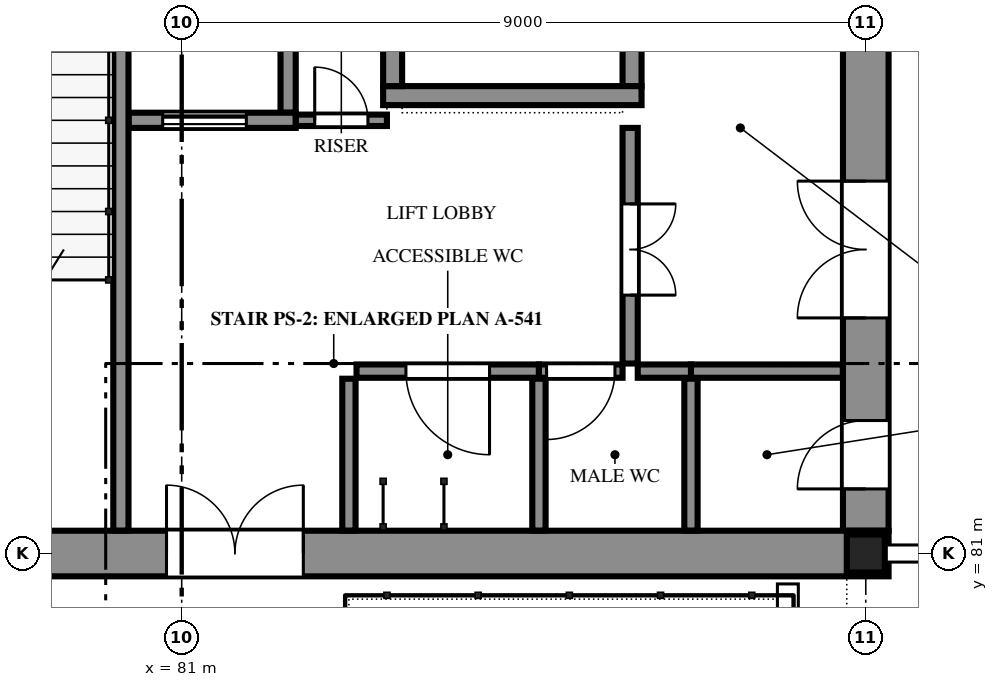
"""IFC4 building model, lengths in metres.
Left out: names, types, materials, properties, quantities, classifications, styles, units other than length and angle.
Written with IfcOpenShell. Run it as: python <this file> out.ifc"""

import sys

from ifc_helpers import new_model, si_unit, direction, frame, frame_2d, origin, origin_2d, place, context, subcontext, project, spatial, polyline, rectangle, hollow_rectangle, outline, extrude, element, fill, save


model = new_model("IFC4")
c1 = context("Model", 3, precision=1e-05, world=origin(), true_north=direction((0.0, 1.0)))
c2 = subcontext(c1, "Body", "Model", "MODEL_VIEW")
j1 = project(units=[si_unit("LENGTHUNIT", "METRE"), si_unit("PLANEANGLEUNIT", "RADIAN")], contexts=[c1])
p1 = place(None, origin())
s1 = spatial("IfcSite", under=j1, at=p1, CompositionType="ELEMENT")
p2 = place(p1, origin())
s2 = spatial("IfcBuilding", under=s1, at=p2, CompositionType="ELEMENT")
p3 = place(p2, frame((0.0, 0.0, 7.5)))
s3 = spatial("IfcBuildingStorey", under=s2, at=p3, CompositionType="ELEMENT", Elevation=7.5)
p4 = place(p3, frame((90.0, 81.0, 0.0), z_axis=(0.0, 0.0, 1.0), x_axis=(1.0, 0.0, 0.0)))
e1 = element("IfcColumn", 1, at=p4, inside=s3, PredefinedType="COLUMN", context=c2, shape_type="SweptSolid", body=[
    extrude(hollow_rectangle(XDim=0.5, YDim=0.5, WallThickness=0.032, at=origin_2d()), origin(), (0.0, 0.0, 1.0), 4.2),
])
p5 = place(p3, frame((71.7, 81.0, 0.0), z_axis=(0.0, 0.0, 1.0), x_axis=(1.0, 0.0, 0.0)))
e2 = element("IfcWall", 2, at=p5, inside=s3, PredefinedType="SOLIDWALL", context=c2, shape_type="SweptSolid", body=[
    extrude(rectangle(XDim=18.6, YDim=0.6, at=frame_2d((9.3, 0.0))), origin(), (0.0, 0.0, 1.0), 4.2),
])
p6 = place(p5, frame((1.6, 0.0, 0.0)))
e3 = element("IfcOpeningElement", 3, at=p6, cuts=e2, PredefinedType="OPENING", context=c2, shape_type="SweptSolid", body=[
    extrude(rectangle(XDim=1.8, YDim=2.1, at=frame_2d((0.9, 1.05))), frame((0.0, 0.31, 0.0), z_axis=(0.0, -1.0, 0.0), x_axis=(1.0, 0.0, 0.0)), (0.0, 0.0, 1.0), 0.62),
])
p7 = place(p5, frame((5.6, 0.0, 0.0)))
e4 = element("IfcOpeningElement", 4, at=p7, cuts=e2, PredefinedType="OPENING", context=c2, shape_type="SweptSolid", body=[
    extrude(rectangle(XDim=1.8, YDim=2.1, at=frame_2d((0.9, 1.05))), frame((0.0, 0.31, 0.0), z_axis=(0.0, -1.0, 0.0), x_axis=(1.0, 0.0, 0.0)), (0.0, 0.0, 1.0), 0.62),
])
p8 = place(p5, frame((9.1, 0.0, 0.0)))
e5 = element("IfcOpeningElement", 5, at=p8, cuts=e2, PredefinedType="OPENING", context=c2, shape_type="SweptSolid", body=[
    extrude(rectangle(XDim=1.8, YDim=2.1, at=frame_2d((0.9, 1.05))), frame((0.0, 0.31, 0.0), z_axis=(0.0, -1.0, 0.0), x_axis=(1.0, 0.0, 0.0)), (0.0, 0.0, 1.0), 0.62),
])
p9 = place(p3, frame((90.0, 81.3, 0.0), z_axis=(0.0, 0.0, 1.0), x_axis=(0.0, 1.0, 0.0)))
e6 = element("IfcWall", 6, at=p9, inside=s3, PredefinedType="SOLIDWALL", context=c2, shape_type="SweptSolid", body=[
    extrude(rectangle(XDim=8.4, YDim=0.6, at=frame_2d((4.2, 0.0))), origin(), (0.0, 0.0, 1.0), 4.2),
])
p10 = place(p9, frame((2.8, 0.0, 0.0)))
e7 = element("IfcOpeningElement", 7, at=p10, cuts=e6, PredefinedType="OPENING", context=c2, shape_type="SweptSolid", body=[
    extrude(rectangle(XDim=1.8, YDim=2.1, at=frame_2d((0.9, 1.05))), frame((0.0, 0.31, 0.0), z_axis=(0.0, -1.0, 0.0), x_axis=(1.0, 0.0, 0.0)), (0.0, 0.0, 1.0), 0.62),
])
p11 = place(p9, frame((0.55, 0.0, 0.0)))
e8 = element("IfcOpeningElement", 8, at=p11, cuts=e6, PredefinedType="OPENING", context=c2, shape_type="SweptSolid", body=[
    extrude(rectangle(XDim=0.9, YDim=2.1, at=frame_2d((0.45, 1.05))), frame((0.0, 0.31, 0.0), z_axis=(0.0, -1.0, 0.0), x_axis=(1.0, 0.0, 0.0)), (0.0, 0.0, 1.0), 0.62),
])
p12 = place(p3, frame((80.2, 81.302, -0.13), z_axis=(0.0, 0.0, 1.0), x_axis=(0.0, 1.0, 0.0)))
e9 = element("IfcWall", 9, at=p12, inside=s3, PredefinedType="SOLIDWALL", context=c2, shape_type="SweptSolid", body=[
    extrude(rectangle(XDim=8.396, YDim=0.2, at=frame_2d((4.198, 0.0))), origin(), (0.0, 0.0, 1.0), 3.646),
])
p13 = place(p3, frame((80.302, 86.7, 0.0), z_axis=(0.0, 0.0, 1.0), x_axis=(1.0, 0.0, 0.0)))
e10 = element("IfcWall", 10, at=p13, inside=s3, PredefinedType="SOLIDWALL", context=c2, shape_type="SweptSolid", body=[
    extrude(rectangle(XDim=2.198, YDim=0.2, at=frame_2d((1.099, 0.0))), origin(), (0.0, 0.0, 1.0), 3.516),
])
p14 = place(p13, frame((0.448, 0.0, 0.0)))
e11 = element("IfcOpeningElement", 11, at=p14, cuts=e10, PredefinedType="OPENING", context=c2, shape_type="SweptSolid", body=[
    extrude(rectangle(XDim=1.1, YDim=2.1, at=frame_2d((0.55, 1.05))), frame((0.0, 0.11, 0.0), z_axis=(0.0, -1.0, 0.0), x_axis=(1.0, 0.0, 0.0)), (0.0, 0.0, 1.0), 0.22),
])
p15 = place(p3, frame((82.4, 86.8, 0.0), z_axis=(0.0, 0.0, 1.0), x_axis=(0.0, 1.0, 0.0)))
e12 = element("IfcWall", 12, at=p15, inside=s3, PredefinedType="SOLIDWALL", context=c2, shape_type="SweptSolid", body=[
    extrude(rectangle(XDim=2.898, YDim=0.2, at=frame_2d((1.449, 0.0))), origin(), (0.0, 0.0, 1.0), 3.516),
])
p16 = place(p3, frame((83.65, 87.025, 0.0), z_axis=(0.0, 0.0, 1.0), x_axis=(1.0, 0.0, 0.0)))
e13 = element("IfcWall", 13, at=p16, inside=s3, PredefinedType="SOLIDWALL", context=c2, shape_type="SweptSolid", body=[
    extrude(rectangle(XDim=3.4, YDim=0.25, at=frame_2d((1.7, 0.0))), origin(), (0.0, 0.0, 1.0), 3.516),
])
p17 = place(p3, frame((83.775, 87.15, 0.0), z_axis=(0.0, 0.0, 1.0), x_axis=(0.0, 1.0, 0.0)))
e14 = element("IfcWall", 14, at=p17, inside=s3, PredefinedType="SOLIDWALL", context=c2, shape_type="SweptSolid", body=[
    extrude(rectangle(XDim=2.2, YDim=0.25, at=frame_2d((1.1, 0.0))), origin(), (0.0, 0.0, 1.0), 3.516),
])
p18 = place(p3, frame((86.925, 87.15, 0.0), z_axis=(0.0, 0.0, 1.0), x_axis=(0.0, 1.0, 0.0)))
e15 = element("IfcWall", 15, at=p18, inside=s3, PredefinedType="SOLIDWALL", context=c2, shape_type="SweptSolid", body=[
    extrude(rectangle(XDim=2.2, YDim=0.25, at=frame_2d((1.1, 0.0))), origin(), (0.0, 0.0, 1.0), 3.516),
])
p19 = place(p18, frame((0.5, 0.0, 0.0)))
e16 = element("IfcOpeningElement", 16, at=p19, cuts=e15, PredefinedType="OPENING", context=c2, shape_type="SweptSolid", body=[
    extrude(rectangle(XDim=1.2, YDim=2.1, at=frame_2d((0.6, 1.05))), frame((0.0, 0.135, 0.0), z_axis=(0.0, -1.0, 0.0), x_axis=(1.0, 0.0, 0.0)), (0.0, 0.0, 1.0), 0.27),
])
p20 = place(p3, frame((85.7, 83.4, 0.0), z_axis=(0.0, 0.0, 1.0), x_axis=(-1.0, 0.0, 0.0)))
e17 = element("IfcWall", 17, at=p20, inside=s3, PredefinedType="PARTITIONING", context=c2, shape_type="SweptSolid", body=[
    extrude(rectangle(XDim=2.4, YDim=0.175, at=frame_2d((1.2, 0.0))), origin(), (0.0, 0.0, 1.0), 3.307),
])
p21 = place(p20, frame((0.65, 0.0, 0.0)))
e18 = element("IfcOpeningElement", 18, at=p21, cuts=e17, PredefinedType="OPENING", context=c2, shape_type="SweptSolid", body=[
    extrude(rectangle(XDim=1.1, YDim=2.1, at=frame_2d((0.55, 1.05))), frame((0.0, 0.097, 0.0), z_axis=(0.0, -1.0, 0.0), x_axis=(1.0, 0.0, 0.0)), (0.0, 0.0, 1.0), 0.195),
])
p22 = place(p3, frame((83.2, 83.3, 0.0), z_axis=(0.0, 0.0, 1.0), x_axis=(0.0, -1.0, 0.0)))
e19 = element("IfcWall", 19, at=p22, inside=s3, PredefinedType="PARTITIONING", context=c2, shape_type="SweptSolid", body=[
    extrude(rectangle(XDim=1.998, YDim=0.175, at=frame_2d((0.999, 0.0))), origin(), (0.0, 0.0, 1.0), 3.307),
])
p23 = place(p3, frame((86.8, 83.4, 0.0), z_axis=(0.0, 0.0, 1.0), x_axis=(-1.0, 0.0, 0.0)))
e20 = element("IfcWall", 20, at=p23, inside=s3, PredefinedType="PARTITIONING", context=c2, shape_type="SweptSolid", body=[
    extrude(rectangle(XDim=1.1, YDim=0.175, at=frame_2d((0.55, 0.0))), origin(), (0.0, 0.0, 1.0), 3.307),
])
p24 = place(p23, frame((0.1, 0.0, 0.0)))
e21 = element("IfcOpeningElement", 21, at=p24, cuts=e20, PredefinedType="OPENING", context=c2, shape_type="SweptSolid", body=[
    extrude(rectangle(XDim=0.9, YDim=2.1, at=frame_2d((0.45, 1.05))), frame((0.0, 0.097, 0.0), z_axis=(0.0, -1.0, 0.0), x_axis=(1.0, 0.0, 0.0)), (0.0, 0.0, 1.0), 0.195),
])
p25 = place(p3, frame((86.9, 86.6, 0.0), z_axis=(0.0, 0.0, 1.0), x_axis=(0.0, -1.0, 0.0)))
e22 = element("IfcWall", 22, at=p25, inside=s3, PredefinedType="PARTITIONING", context=c2, shape_type="SweptSolid", body=[
    extrude(rectangle(XDim=3.1, YDim=0.2, at=frame_2d((1.55, 0.0))), origin(), (0.0, 0.0, 1.0), 3.382),
])
p26 = place(p25, frame((1.0, 0.0, 0.0)))
e23 = element("IfcOpeningElement", 23, at=p26, cuts=e22, PredefinedType="OPENING", context=c2, shape_type="SweptSolid", body=[
    extrude(rectangle(XDim=1.2, YDim=2.1, at=frame_2d((0.6, 1.05))), frame((0.0, 0.11, 0.0), z_axis=(0.0, -1.0, 0.0), x_axis=(1.0, 0.0, 0.0)), (0.0, 0.0, 1.0), 0.22),
])
p27 = place(p3, frame((82.502, 86.7, 0.0), z_axis=(0.0, 0.0, 1.0), x_axis=(1.0, 0.0, 0.0)))
e24 = element("IfcWall", 24, at=p27, inside=s3, PredefinedType="SOLIDWALL", context=c2, shape_type="SweptSolid", body=[
    extrude(rectangle(XDim=1.198, YDim=0.15, at=frame_2d((0.599, 0.0))), origin(), (0.0, 0.0, 1.0), 3.516),
])
p28 = place(p27, frame((0.248, 0.0, 0.0)))
e25 = element("IfcOpeningElement", 25, at=p28, cuts=e24, PredefinedType="OPENING", context=c2, shape_type="SweptSolid", body=[
    extrude(rectangle(XDim=0.7, YDim=2.0, at=frame_2d((0.35, 1.0))), frame((0.0, 0.085, 0.0), z_axis=(0.0, -1.0, 0.0), x_axis=(1.0, 0.0, 0.0)), (0.0, 0.0, 1.0), 0.17),
])
p29 = place(p3, frame((89.698, 83.4, 0.0), z_axis=(0.0, 0.0, 1.0), x_axis=(-1.0, 0.0, 0.0)))
e26 = element("IfcWall", 26, at=p29, inside=s3, PredefinedType="PARTITIONING", context=c2, shape_type="SweptSolid", body=[
    extrude(rectangle(XDim=1.998, YDim=0.175, at=frame_2d((0.999, 0.0))), origin(), (0.0, 0.0, 1.0), 3.307),
])
p30 = place(p3, frame((87.7, 83.4, 0.0), z_axis=(0.0, 0.0, 1.0), x_axis=(-1.0, 0.0, 0.0)))
e27 = element("IfcWall", 27, at=p30, inside=s3, PredefinedType="PARTITIONING", context=c2, shape_type="SweptSolid", body=[
    extrude(rectangle(XDim=0.7, YDim=0.175, at=frame_2d((0.35, 0.0))), origin(), (0.0, 0.0, 1.0), 3.307),
])
for number, where, z_axis, x_axis in (
    (28, (85.7, 83.3, 0.0), (0.0, 0.0, 1.0), (0.0, -1.0, 0.0)),
    (29, (87.7, 83.3, 0.0), (0.0, 0.0, 1.0), (0.0, -1.0, 0.0)),
):
    element("IfcWall", number, at=place(p3, frame(where, z_axis=z_axis, x_axis=x_axis)), inside=s3, PredefinedType="PARTITIONING", context=c2, shape_type="SweptSolid", body=[
        extrude(rectangle(XDim=1.998, YDim=0.175, at=frame_2d((0.999, 0.0))), origin(), (0.0, 0.0, 1.0), 3.307),
    ])
p31 = place(p14, origin())
e30 = element("IfcDoor", 30, at=p31, inside=s3, OperationType="SLIDING_TO_LEFT", PredefinedType="DOOR", context=c2, shape_type="SweptSolid", body=[
    extrude(outline(polyline([(0.0, 0.0), (0.07, 0.0), (0.07, 2.03), (1.03, 2.03), (1.03, 0.0), (1.1, 0.0), (1.1, 2.1), (0.0, 2.1), (0.0, 0.0)])), frame((0.0, 0.025, 0.0), z_axis=(0.0, -1.0, 0.0), x_axis=(1.0, 0.0, 0.0)), (0.0, 0.0, 1.0), 0.05),
    extrude(rectangle(XDim=0.524, YDim=2.016, at=frame_2d((0.336, 1.018))), frame((0.0, 0.018, 0.0), z_axis=(0.0, -1.0, 0.0), x_axis=(1.0, 0.0, 0.0)), (0.0, 0.0, 1.0), 0.016),
    extrude(rectangle(XDim=0.52, YDim=2.016, at=frame_2d((0.766, 1.018))), frame((0.0, -0.002, 0.0), z_axis=(0.0, -1.0, 0.0), x_axis=(1.0, 0.0, 0.0)), (0.0, 0.0, 1.0), 0.016),
])
fill(e11, e30)
p32 = place(p8, origin())
e31 = element("IfcDoor", 31, at=p32, inside=s3, OperationType="DOUBLE_DOOR_SINGLE_SWING", PredefinedType="DOOR", context=c2, shape_type="SweptSolid", body=[
    extrude(outline(polyline([(0.0, 0.0), (0.07, 0.0), (0.07, 2.03), (1.73, 2.03), (1.73, 0.0), (1.8, 0.0), (1.8, 2.1), (0.0, 2.1), (0.0, 0.0)])), frame((0.0, 0.025, 0.0), z_axis=(0.0, -1.0, 0.0), x_axis=(1.0, 0.0, 0.0)), (0.0, 0.0, 1.0), 0.05),
    extrude(outline(polyline([(0.074, 0.01), (0.897, 0.01), (0.897, 2.026), (0.074, 2.026), (0.074, 0.01)]), holes=[polyline([(0.194, 0.16), (0.777, 0.16), (0.777, 1.01), (0.194, 1.01), (0.194, 0.16)]), polyline([(0.335, 1.16), (0.635, 1.16), (0.635, 1.76), (0.335, 1.76), (0.335, 1.16)])]), frame((0.0, 0.017, 0.0), z_axis=(0.0, -1.0, 0.0), x_axis=(1.0, 0.0, 0.0)), (0.0, 0.0, 1.0), 0.035),
    extrude(rectangle(XDim=0.583, YDim=0.85, at=frame_2d((0.485, 0.585))), frame((0.0, 0.009, 0.0), z_axis=(0.0, -1.0, 0.0), x_axis=(1.0, 0.0, 0.0)), (0.0, 0.0, 1.0), 0.017),
    extrude(rectangle(XDim=0.3, YDim=0.6, at=frame_2d((0.485, 1.46))), frame((0.0, 0.006, 0.0), z_axis=(0.0, -1.0, 0.0), x_axis=(1.0, 0.0, 0.0)), (0.0, 0.0, 1.0), 0.012),
    extrude(outline(polyline([(0.903, 0.01), (1.726, 0.01), (1.726, 2.026), (0.903, 2.026), (0.903, 0.01)]), holes=[polyline([(1.023, 0.16), (1.606, 0.16), (1.606, 1.01), (1.023, 1.01), (1.023, 0.16)]), polyline([(1.165, 1.16), (1.465, 1.16), (1.465, 1.76), (1.165, 1.76), (1.165, 1.16)])]), frame((0.0, 0.017, 0.0), z_axis=(0.0, -1.0, 0.0), x_axis=(1.0, 0.0, 0.0)), (0.0, 0.0, 1.0), 0.035),
    extrude(rectangle(XDim=0.583, YDim=0.85, at=frame_2d((1.314, 0.585))), frame((0.0, 0.009, 0.0), z_axis=(0.0, -1.0, 0.0), x_axis=(1.0, 0.0, 0.0)), (0.0, 0.0, 1.0), 0.017),
    extrude(rectangle(XDim=0.3, YDim=0.6, at=frame_2d((1.314, 1.46))), frame((0.0, 0.006, 0.0), z_axis=(0.0, -1.0, 0.0), x_axis=(1.0, 0.0, 0.0)), (0.0, 0.0, 1.0), 0.012),
])
fill(e5, e31)
p33 = place(p26, origin())
e32 = element("IfcDoor", 32, at=p33, inside=s3, OperationType="DOUBLE_DOOR_SINGLE_SWING", PredefinedType="DOOR", context=c2, shape_type="SweptSolid", body=[
    extrude(outline(polyline([(0.0, 0.0), (0.07, 0.0), (0.07, 2.03), (1.13, 2.03), (1.13, 0.0), (1.2, 0.0), (1.2, 2.1), (0.0, 2.1), (0.0, 0.0)])), frame((0.0, 0.025, 0.0), z_axis=(0.0, -1.0, 0.0), x_axis=(1.0, 0.0, 0.0)), (0.0, 0.0, 1.0), 0.05),
    extrude(outline(polyline([(0.074, 0.01), (0.597, 0.01), (0.597, 2.026), (0.074, 2.026), (0.074, 0.01)]), holes=[polyline([(0.178, 0.373), (0.492, 0.373), (0.492, 1.784), (0.178, 1.784), (0.178, 0.373)])]), frame((0.0, 0.017, 0.0), z_axis=(0.0, -1.0, 0.0), x_axis=(1.0, 0.0, 0.0)), (0.0, 0.0, 1.0), 0.035),
    extrude(rectangle(XDim=0.314, YDim=1.411, at=frame_2d((0.335, 1.079))), frame((0.0, 0.009, 0.0), z_axis=(0.0, -1.0, 0.0), x_axis=(1.0, 0.0, 0.0)), (0.0, 0.0, 1.0), 0.017),
    extrude(outline(polyline([(0.603, 0.01), (1.126, 0.01), (1.126, 2.026), (0.603, 2.026), (0.603, 0.01)]), holes=[polyline([(0.708, 0.373), (1.021, 0.373), (1.021, 1.784), (0.708, 1.784), (0.708, 0.373)])]), frame((0.0, 0.017, 0.0), z_axis=(0.0, -1.0, 0.0), x_axis=(1.0, 0.0, 0.0)), (0.0, 0.0, 1.0), 0.035),
    extrude(rectangle(XDim=0.314, YDim=1.411, at=frame_2d((0.865, 1.079))), frame((0.0, 0.009, 0.0), z_axis=(0.0, -1.0, 0.0), x_axis=(1.0, 0.0, 0.0)), (0.0, 0.0, 1.0), 0.017),
])
fill(e23, e32)
p34 = place(p10, origin())
e33 = element("IfcDoor", 33, at=p34, inside=s3, OperationType="DOUBLE_DOOR_SINGLE_SWING", PredefinedType="DOOR", context=c2, shape_type="SweptSolid", body=[
    extrude(outline(polyline([(0.0, 0.0), (0.07, 0.0), (0.07, 2.03), (1.73, 2.03), (1.73, 0.0), (1.8, 0.0), (1.8, 2.1), (0.0, 2.1), (0.0, 0.0)])), frame((0.0, 0.025, 0.0), z_axis=(0.0, -1.0, 0.0), x_axis=(1.0, 0.0, 0.0)), (0.0, 0.0, 1.0), 0.05),
    extrude(outline(polyline([(0.074, 0.01), (0.897, 0.01), (0.897, 2.026), (0.074, 2.026), (0.074, 0.01)]), holes=[polyline([(0.194, 0.16), (0.777, 0.16), (0.777, 1.01), (0.194, 1.01), (0.194, 0.16)]), polyline([(0.335, 1.16), (0.635, 1.16), (0.635, 1.76), (0.335, 1.76), (0.335, 1.16)])]), frame((0.0, 0.017, 0.0), z_axis=(0.0, -1.0, 0.0), x_axis=(1.0, 0.0, 0.0)), (0.0, 0.0, 1.0), 0.035),
    extrude(rectangle(XDim=0.583, YDim=0.85, at=frame_2d((0.485, 0.585))), frame((0.0, 0.009, 0.0), z_axis=(0.0, -1.0, 0.0), x_axis=(1.0, 0.0, 0.0)), (0.0, 0.0, 1.0), 0.017),
    extrude(rectangle(XDim=0.3, YDim=0.6, at=frame_2d((0.485, 1.46))), frame((0.0, 0.006, 0.0), z_axis=(0.0, -1.0, 0.0), x_axis=(1.0, 0.0, 0.0)), (0.0, 0.0, 1.0), 0.012),
    extrude(outline(polyline([(0.903, 0.01), (1.726, 0.01), (1.726, 2.026), (0.903, 2.026), (0.903, 0.01)]), holes=[polyline([(1.023, 0.16), (1.606, 0.16), (1.606, 1.01), (1.023, 1.01), (1.023, 0.16)]), polyline([(1.165, 1.16), (1.465, 1.16), (1.465, 1.76), (1.165, 1.76), (1.165, 1.16)])]), frame((0.0, 0.017, 0.0), z_axis=(0.0, -1.0, 0.0), x_axis=(1.0, 0.0, 0.0)), (0.0, 0.0, 1.0), 0.035),
    extrude(rectangle(XDim=0.583, YDim=0.85, at=frame_2d((1.314, 0.585))), frame((0.0, 0.009, 0.0), z_axis=(0.0, -1.0, 0.0), x_axis=(1.0, 0.0, 0.0)), (0.0, 0.0, 1.0), 0.017),
    extrude(rectangle(XDim=0.3, YDim=0.6, at=frame_2d((1.314, 1.46))), frame((0.0, 0.006, 0.0), z_axis=(0.0, -1.0, 0.0), x_axis=(1.0, 0.0, 0.0)), (0.0, 0.0, 1.0), 0.012),
])
fill(e7, e33)
p35 = place(p28, origin())
e34 = element("IfcDoor", 34, at=p35, inside=s3, OperationType="SINGLE_SWING_LEFT", PredefinedType="DOOR", context=c2, shape_type="SweptSolid", body=[
    extrude(outline(polyline([(0.0, 0.0), (0.07, 0.0), (0.07, 1.93), (0.63, 1.93), (0.63, 0.0), (0.7, 0.0), (0.7, 2.0), (0.0, 2.0), (0.0, 0.0)])), frame((0.0, 0.025, 0.0), z_axis=(0.0, -1.0, 0.0), x_axis=(1.0, 0.0, 0.0)), (0.0, 0.0, 1.0), 0.05),
    extrude(outline(polyline([(0.074, 0.01), (0.626, 0.01), (0.626, 1.926), (0.074, 1.926), (0.074, 0.01)]), holes=[polyline([(0.184, 0.16), (0.516, 0.16), (0.516, 1.01), (0.184, 1.01), (0.184, 0.16)]), polyline([(0.2, 1.16), (0.5, 1.16), (0.5, 1.76), (0.2, 1.76), (0.2, 1.16)])]), frame((0.0, 0.017, 0.0), z_axis=(0.0, -1.0, 0.0), x_axis=(1.0, 0.0, 0.0)), (0.0, 0.0, 1.0), 0.035),
    extrude(rectangle(XDim=0.331, YDim=0.85, at=frame_2d((0.35, 0.585))), frame((0.0, 0.009, 0.0), z_axis=(0.0, -1.0, 0.0), x_axis=(1.0, 0.0, 0.0)), (0.0, 0.0, 1.0), 0.017),
    extrude(rectangle(XDim=0.3, YDim=0.6, at=frame_2d((0.35, 1.46))), frame((0.0, 0.006, 0.0), z_axis=(0.0, -1.0, 0.0), x_axis=(1.0, 0.0, 0.0)), (0.0, 0.0, 1.0), 0.012),
])
fill(e25, e34)
p36 = place(p21, origin())
e35 = element("IfcDoor", 35, at=p36, inside=s3, OperationType="SINGLE_SWING_LEFT", PredefinedType="DOOR", context=c2, shape_type="SweptSolid", body=[
    extrude(outline(polyline([(0.0, 0.0), (0.07, 0.0), (0.07, 2.03), (1.03, 2.03), (1.03, 0.0), (1.1, 0.0), (1.1, 2.1), (0.0, 2.1), (0.0, 0.0)])), frame((0.0, 0.025, 0.0), z_axis=(0.0, -1.0, 0.0), x_axis=(1.0, 0.0, 0.0)), (0.0, 0.0, 1.0), 0.05),
    extrude(outline(polyline([(0.074, 0.01), (1.026, 0.01), (1.026, 2.026), (0.074, 2.026), (0.074, 0.01)]), holes=[polyline([(0.194, 0.16), (0.906, 0.16), (0.906, 1.01), (0.194, 1.01), (0.194, 0.16)]), polyline([(0.4, 1.16), (0.7, 1.16), (0.7, 1.76), (0.4, 1.76), (0.4, 1.16)])]), frame((0.0, 0.017, 0.0), z_axis=(0.0, -1.0, 0.0), x_axis=(1.0, 0.0, 0.0)), (0.0, 0.0, 1.0), 0.035),
    extrude(rectangle(XDim=0.712, YDim=0.85, at=frame_2d((0.55, 0.585))), frame((0.0, 0.009, 0.0), z_axis=(0.0, -1.0, 0.0), x_axis=(1.0, 0.0, 0.0)), (0.0, 0.0, 1.0), 0.017),
    extrude(rectangle(XDim=0.3, YDim=0.6, at=frame_2d((0.55, 1.46))), frame((0.0, 0.006, 0.0), z_axis=(0.0, -1.0, 0.0), x_axis=(1.0, 0.0, 0.0)), (0.0, 0.0, 1.0), 0.012),
])
fill(e18, e35)
p37 = place(p24, origin())
e36 = element("IfcDoor", 36, at=p37, inside=s3, OperationType="SINGLE_SWING_RIGHT", PredefinedType="DOOR", context=c2, shape_type="SweptSolid", body=[
    extrude(outline(polyline([(0.0, 0.0), (0.07, 0.0), (0.07, 2.03), (0.83, 2.03), (0.83, 0.0), (0.9, 0.0), (0.9, 2.1), (0.0, 2.1), (0.0, 0.0)])), frame((0.0, 0.025, 0.0), z_axis=(0.0, -1.0, 0.0), x_axis=(1.0, 0.0, 0.0)), (0.0, 0.0, 1.0), 0.05),
    extrude(outline(polyline([(0.074, 0.01), (0.826, 0.01), (0.826, 2.026), (0.074, 2.026), (0.074, 0.01)]), holes=[polyline([(0.194, 0.16), (0.706, 0.16), (0.706, 1.01), (0.194, 1.01), (0.194, 0.16)]), polyline([(0.3, 1.16), (0.6, 1.16), (0.6, 1.76), (0.3, 1.76), (0.3, 1.16)])]), frame((0.0, 0.017, 0.0), z_axis=(0.0, -1.0, 0.0), x_axis=(1.0, 0.0, 0.0)), (0.0, 0.0, 1.0), 0.035),
    extrude(rectangle(XDim=0.512, YDim=0.85, at=frame_2d((0.45, 0.585))), frame((0.0, 0.009, 0.0), z_axis=(0.0, -1.0, 0.0), x_axis=(1.0, 0.0, 0.0)), (0.0, 0.0, 1.0), 0.017),
    extrude(rectangle(XDim=0.3, YDim=0.6, at=frame_2d((0.45, 1.46))), frame((0.0, 0.006, 0.0), z_axis=(0.0, -1.0, 0.0), x_axis=(1.0, 0.0, 0.0)), (0.0, 0.0, 1.0), 0.012),
])
fill(e21, e36)
p38 = place(p11, origin())
e37 = element("IfcDoor", 37, at=p38, inside=s3, OperationType="SINGLE_SWING_LEFT", PredefinedType="DOOR", context=c2, shape_type="SweptSolid", body=[
    extrude(outline(polyline([(0.0, 0.0), (0.07, 0.0), (0.07, 2.03), (0.83, 2.03), (0.83, 0.0), (0.9, 0.0), (0.9, 2.1), (0.0, 2.1), (0.0, 0.0)])), frame((0.0, 0.025, 0.0), z_axis=(0.0, -1.0, 0.0), x_axis=(1.0, 0.0, 0.0)), (0.0, 0.0, 1.0), 0.05),
    extrude(outline(polyline([(0.074, 0.01), (0.826, 0.01), (0.826, 2.026), (0.074, 2.026), (0.074, 0.01)]), holes=[polyline([(0.194, 0.16), (0.706, 0.16), (0.706, 1.01), (0.194, 1.01), (0.194, 0.16)]), polyline([(0.3, 1.16), (0.6, 1.16), (0.6, 1.76), (0.3, 1.76), (0.3, 1.16)])]), frame((0.0, 0.017, 0.0), z_axis=(0.0, -1.0, 0.0), x_axis=(1.0, 0.0, 0.0)), (0.0, 0.0, 1.0), 0.035),
    extrude(rectangle(XDim=0.512, YDim=0.85, at=frame_2d((0.45, 0.585))), frame((0.0, 0.009, 0.0), z_axis=(0.0, -1.0, 0.0), x_axis=(1.0, 0.0, 0.0)), (0.0, 0.0, 1.0), 0.017),
    extrude(rectangle(XDim=0.3, YDim=0.6, at=frame_2d((0.45, 1.46))), frame((0.0, 0.006, 0.0), z_axis=(0.0, -1.0, 0.0), x_axis=(1.0, 0.0, 0.0)), (0.0, 0.0, 1.0), 0.012),
])
fill(e8, e37)
save(model, sys.argv[1])
